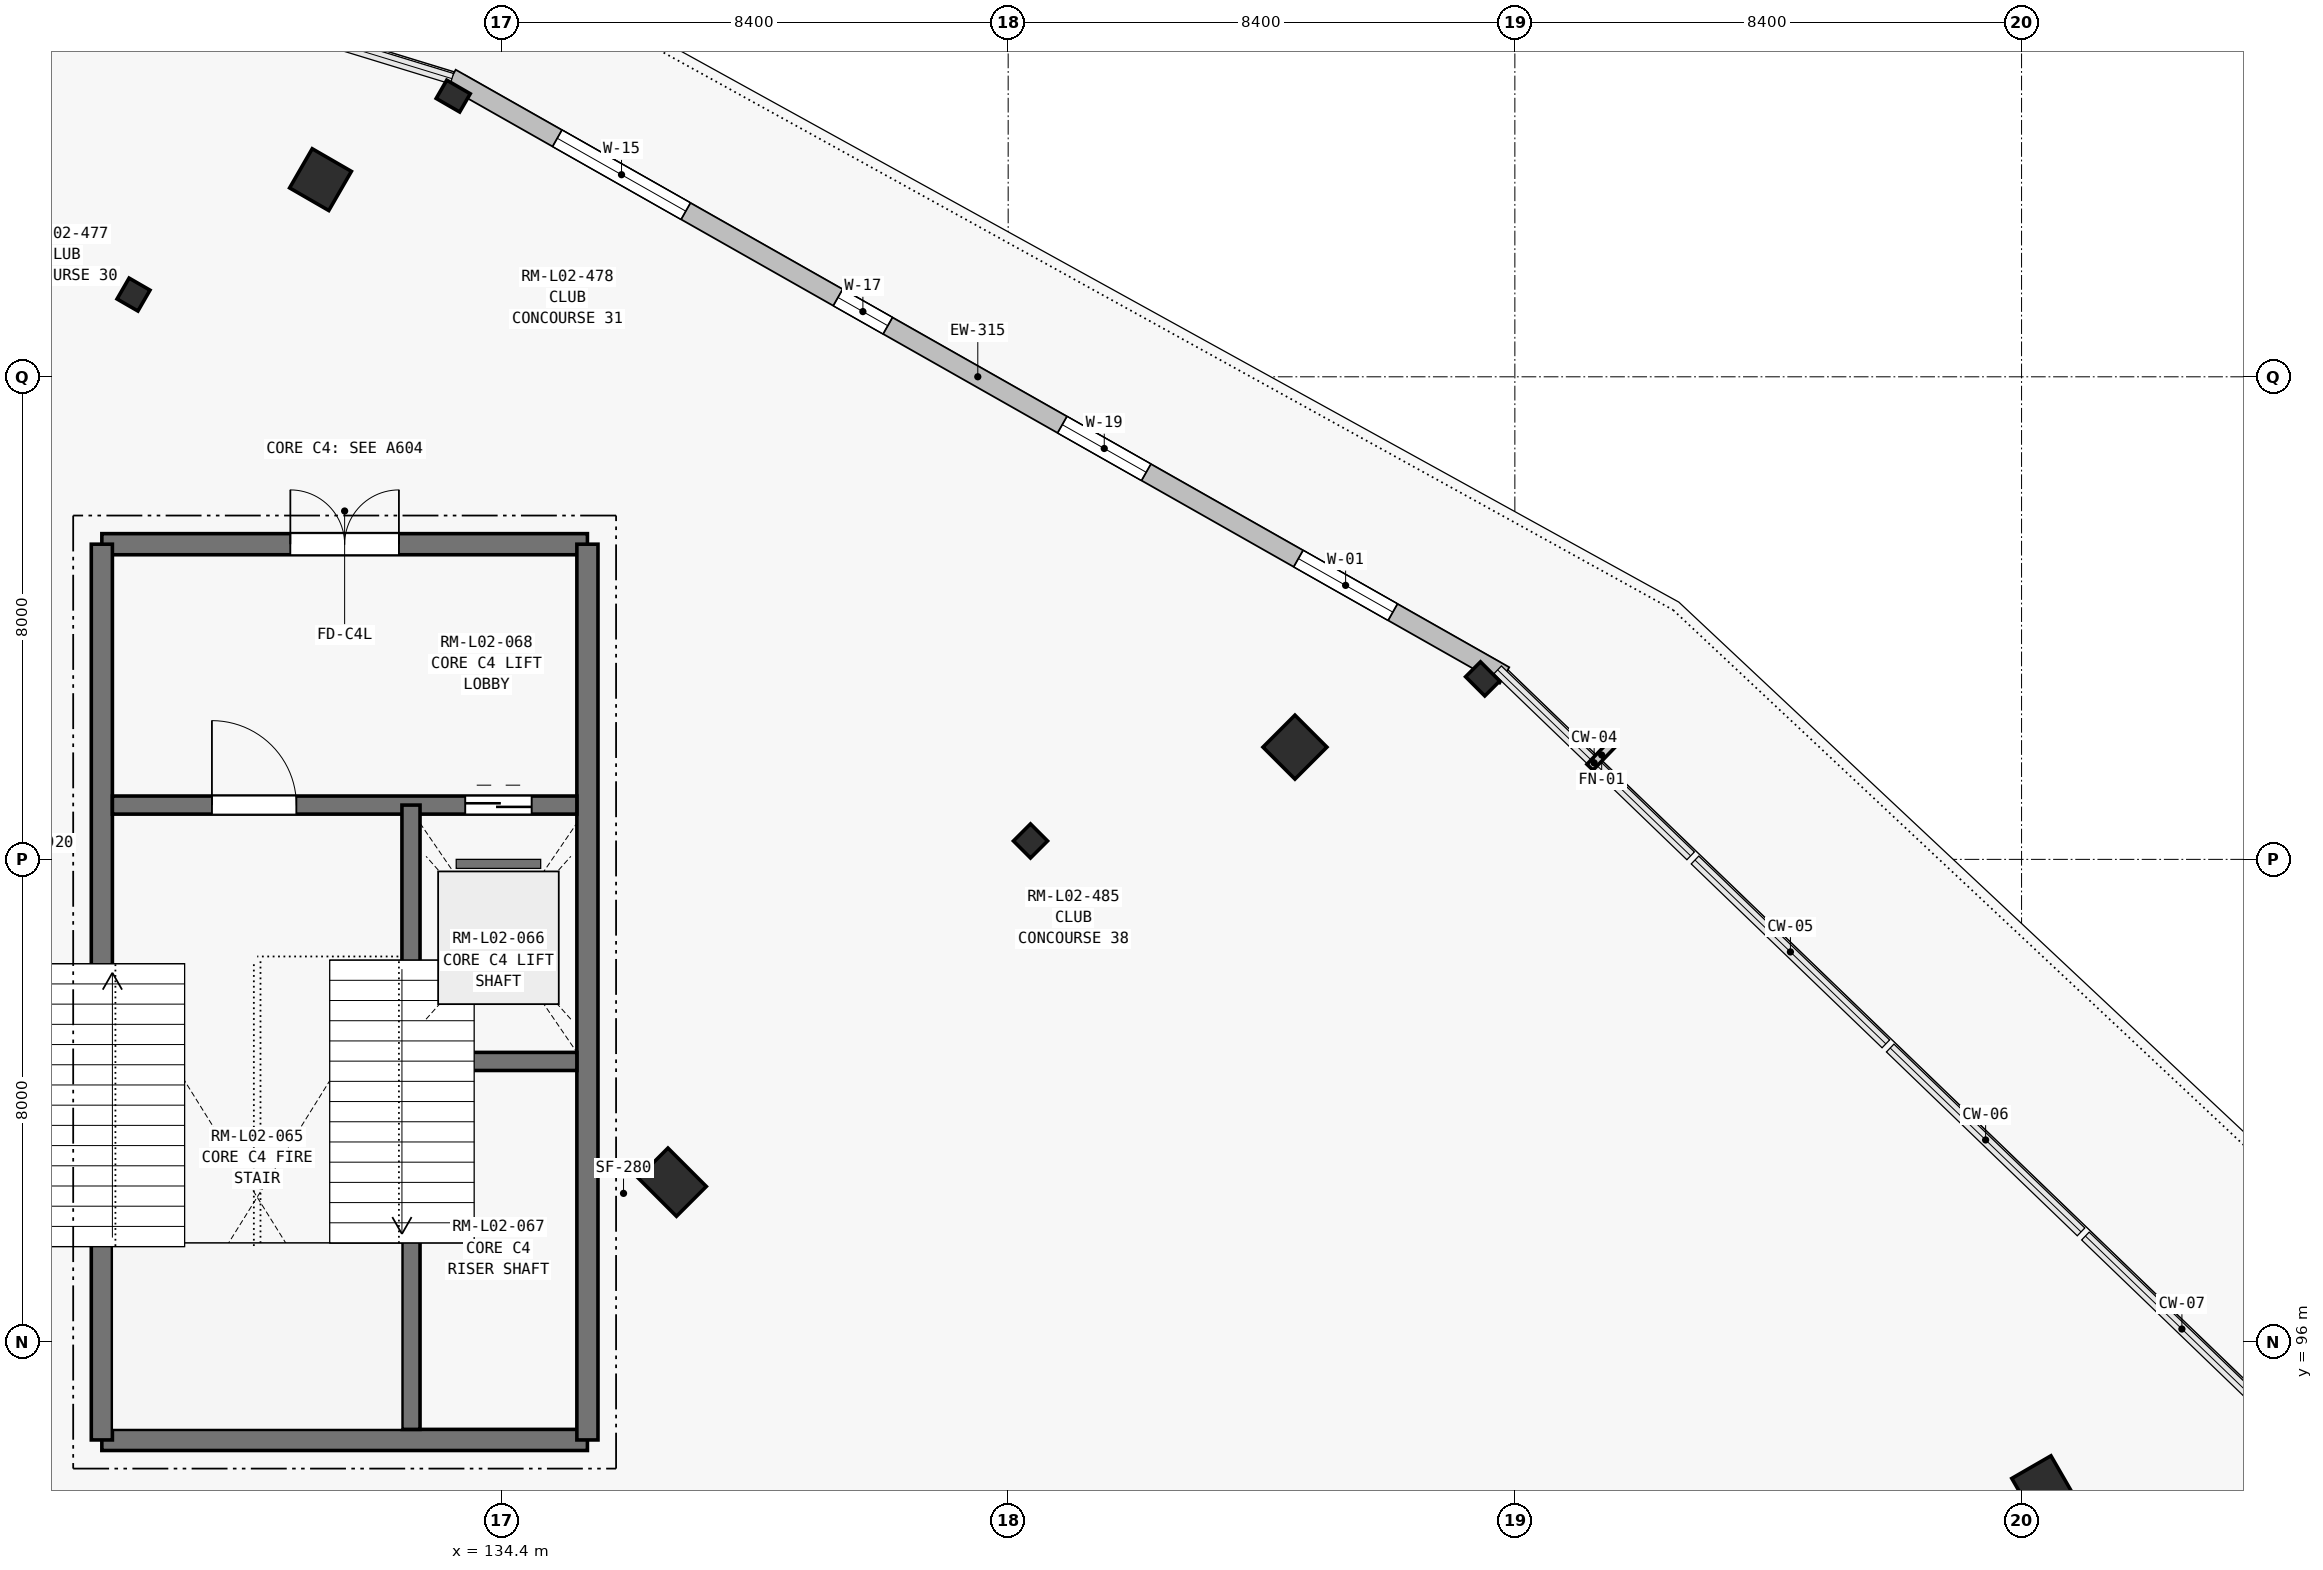
"""IFC4 building model, lengths in metres.
Left out: names, types, materials, properties, quantities, classifications, styles, units other than length and angle.
Written with IfcOpenShell. Run it as: python <this file> out.ifc"""

import sys

from ifc_helpers import new_model, si_unit, direction, frame, frame_2d, origin, origin_2d, place, context, subcontext, project, spatial, rectangle, i_section, extrude, element, fill, save


model = new_model("IFC4")
c1 = context("Model", 3, precision=1e-05, world=origin(), true_north=direction((0.0, 1.0)))
c2 = subcontext(c1, "Body", "Model", "MODEL_VIEW")
j1 = project(units=[si_unit("LENGTHUNIT", "METRE"), si_unit("PLANEANGLEUNIT", "RADIAN")], contexts=[c1])
p1 = place(None, origin())
s1 = spatial("IfcSite", under=j1, at=p1, CompositionType="ELEMENT")
p2 = place(p1, origin())
s2 = spatial("IfcBuilding", under=s1, at=p2, CompositionType="ELEMENT")
p3 = place(p2, frame((0.0, 0.0, 9.9)))
s3 = spatial("IfcBuildingStorey", under=s2, at=p3, CompositionType="ELEMENT", Elevation=9.9)
p4 = place(p3, frame((137.231, 98.648, 0.0), z_axis=(0.0, 0.0, 1.0), x_axis=(0.707106781187, 0.707106781187, 0.0)))
e1 = element("IfcColumn", 1, at=p4, inside=s3, PredefinedType="COLUMN", context=c2, shape_type="SweptSolid", body=[
    extrude(rectangle(XDim=0.7, YDim=0.9, at=origin_2d()), origin(), (0.0, 0.0, 1.0), 4.5),
])
for number, where, z_axis, x_axis in (
    (2, (143.17, 104.305, 0.0), (0.0, 0.0, 1.0), (0.707, 0.707, 0.0)),
    (3, (128.3, 113.363, 0.0), (0.0, 0.0, 1.0), (0.5, 0.866, 0.0)),
):
    element("IfcColumn", number, at=place(p3, frame(where, z_axis=z_axis, x_axis=x_axis)), inside=s3, PredefinedType="COLUMN", context=c2, shape_type="SweptSolid", body=[
        extrude(i_section(OverallWidth=0.4, OverallDepth=0.4, WebThickness=0.016, FlangeThickness=0.028, at=origin_2d()), origin(), (0.0, 0.0, 1.0), 4.5),
    ])
for number, where, z_axis, x_axis in (
    (4, (159.95, 93.6, 0.0), (0.0, 0.0, 1.0), (0.866, 0.5, 0.0)),
    (5, (147.554, 105.861, 0.0), (0.0, 0.0, 1.0), (0.707, 0.707, 0.0)),
    (6, (131.4, 115.269, 0.0), (0.0, 0.0, 1.0), (0.5, 0.866, 0.0)),
):
    element("IfcColumn", number, at=place(p3, frame(where, z_axis=z_axis, x_axis=x_axis)), inside=s3, PredefinedType="COLUMN", context=c2, shape_type="SweptSolid", body=[
        extrude(rectangle(XDim=0.75, YDim=0.75, at=origin_2d()), origin(), (0.0, 0.0, 1.0), 4.5),
    ])
for number, where, z_axis, x_axis in (
    (7, (150.666, 106.992, 0.0), (0.0, 0.0, 1.0), (0.707, 0.707, 0.0)),
    (8, (133.6, 116.654, 0.0), (0.0, 0.0, 1.0), (0.5, 0.866, 0.0)),
):
    element("IfcColumn", number, at=place(p3, frame(where, z_axis=z_axis, x_axis=x_axis)), inside=s3, PredefinedType="PILASTER", context=c2, shape_type="SweptSolid", body=[
        extrude(rectangle(XDim=0.35, YDim=0.45, at=origin_2d()), origin(), (0.0, 0.0, 1.0), 5.45),
    ])
p5 = place(p3, frame((133.563, 116.954, 0.0), z_axis=(0.0, 0.0, 1.0), x_axis=(0.869839071827, -0.493335574557, 0.0)))
e9 = element("IfcWall", 9, at=p5, inside=s3, PredefinedType="SOLIDWALL", context=c2, shape_type="SweptSolid", body=[
    extrude(rectangle(XDim=20.08, YDim=0.315, at=frame_2d((10.04, 0.0))), origin(), (0.0, 0.0, 1.0), 4.265),
])
p6 = place(p5, frame((2.025, 0.0, 0.9)))
e10 = element("IfcOpeningElement", 10, at=p6, cuts=e9, PredefinedType="OPENING", context=c2, shape_type="SweptSolid", body=[
    extrude(rectangle(XDim=2.45, YDim=1.35, at=frame_2d((1.225, 0.675))), frame((0.0, 0.167, 0.0), z_axis=(0.0, -1.0, 0.0), x_axis=(1.0, 0.0, 0.0)), (0.0, 0.0, 1.0), 0.335),
])
p7 = place(p5, frame((7.375, 0.0, 0.75)))
e11 = element("IfcOpeningElement", 11, at=p7, cuts=e9, PredefinedType="OPENING", context=c2, shape_type="SweptSolid", body=[
    extrude(rectangle(XDim=0.95, YDim=2.2, at=frame_2d((0.475, 1.1))), frame((0.0, 0.167, 0.0), z_axis=(0.0, -1.0, 0.0), x_axis=(1.0, 0.0, 0.0)), (0.0, 0.0, 1.0), 0.335),
])
p8 = place(p5, frame((11.65, 0.0, 0.9)))
e12 = element("IfcOpeningElement", 12, at=p8, cuts=e9, PredefinedType="OPENING", context=c2, shape_type="SweptSolid", body=[
    extrude(rectangle(XDim=1.6, YDim=1.45, at=frame_2d((0.8, 0.725))), frame((0.0, 0.167, 0.0), z_axis=(0.0, -1.0, 0.0), x_axis=(1.0, 0.0, 0.0)), (0.0, 0.0, 1.0), 0.335),
])
p9 = place(p5, frame((16.15, 0.0, 0.75)))
e13 = element("IfcOpeningElement", 13, at=p9, cuts=e9, PredefinedType="OPENING", context=c2, shape_type="SweptSolid", body=[
    extrude(rectangle(XDim=1.8, YDim=2.4, at=frame_2d((0.9, 1.2))), frame((0.0, 0.167, 0.0), z_axis=(0.0, -1.0, 0.0), x_axis=(1.0, 0.0, 0.0)), (0.0, 0.0, 1.0), 0.335),
])
p10 = place(p3, frame((127.775, 94.375, 0.0), z_axis=(0.0, 0.0, 1.0), x_axis=(1.0, 0.0, 0.0)))
e14 = element("IfcWall", 14, at=p10, inside=s3, PredefinedType="SHEAR", context=c2, shape_type="SweptSolid", body=[
    extrude(rectangle(XDim=8.05, YDim=0.35, at=frame_2d((4.025, 0.0))), origin(), (0.0, 0.0, 1.0), 4.5),
])
p11 = place(p3, frame((127.775, 109.225, 0.0), z_axis=(0.0, 0.0, 1.0), x_axis=(1.0, 0.0, 0.0)))
e15 = element("IfcWall", 15, at=p11, inside=s3, PredefinedType="SHEAR", context=c2, shape_type="SweptSolid", body=[
    extrude(rectangle(XDim=8.05, YDim=0.35, at=frame_2d((4.025, 0.0))), origin(), (0.0, 0.0, 1.0), 4.5),
])
p12 = place(p11, frame((3.125, 0.0, 0.0)))
e16 = element("IfcOpeningElement", 16, at=p12, cuts=e15, PredefinedType="OPENING", context=c2, shape_type="SweptSolid", body=[
    extrude(rectangle(XDim=1.8, YDim=2.25, at=frame_2d((0.9, 1.125))), frame((0.0, 0.185, 0.0), z_axis=(0.0, -1.0, 0.0), x_axis=(1.0, 0.0, 0.0)), (0.0, 0.0, 1.0), 0.37),
])
for number, where, z_axis, x_axis in (
    (17, (127.775, 94.375, 0.0), (0.0, 0.0, 1.0), (0.0, 1.0, 0.0)),
    (18, (135.825, 94.375, 0.0), (0.0, 0.0, 1.0), (0.0, 1.0, 0.0)),
):
    element("IfcWall", number, at=place(p3, frame(where, z_axis=z_axis, x_axis=x_axis)), inside=s3, PredefinedType="SHEAR", context=c2, shape_type="SweptSolid", body=[
        extrude(rectangle(XDim=14.85, YDim=0.35, at=frame_2d((7.425, 0.0))), origin(), (0.0, 0.0, 1.0), 4.5),
    ])
p13 = place(p3, frame((127.95, 104.9, 0.0), z_axis=(0.0, 0.0, 1.0), x_axis=(1.0, 0.0, 0.0)))
e19 = element("IfcWall", 19, at=p13, inside=s3, PredefinedType="SHEAR", context=c2, shape_type="SweptSolid", body=[
    extrude(rectangle(XDim=7.7, YDim=0.3, at=frame_2d((3.85, 0.0))), origin(), (0.0, 0.0, 1.0), 4.5),
])
p14 = place(p13, frame((1.65, 0.0, 0.0)))
e20 = element("IfcOpeningElement", 20, at=p14, cuts=e19, PredefinedType="OPENING", context=c2, shape_type="SweptSolid", body=[
    extrude(rectangle(XDim=1.4, YDim=2.2, at=frame_2d((0.7, 1.1))), frame((0.0, 0.16, 0.0), z_axis=(0.0, -1.0, 0.0), x_axis=(1.0, 0.0, 0.0)), (0.0, 0.0, 1.0), 0.32),
])
p15 = place(p13, frame((5.85, 0.0, 0.0)))
e21 = element("IfcOpeningElement", 21, at=p15, cuts=e19, PredefinedType="OPENING", context=c2, shape_type="SweptSolid", body=[
    extrude(rectangle(XDim=1.1, YDim=2.2, at=frame_2d((0.55, 1.1))), frame((0.0, 0.16, 0.0), z_axis=(0.0, -1.0, 0.0), x_axis=(1.0, 0.0, 0.0)), (0.0, 0.0, 1.0), 0.32),
])
p16 = place(p3, frame((132.9, 94.55, 0.0), z_axis=(0.0, 0.0, 1.0), x_axis=(0.0, 1.0, 0.0)))
e22 = element("IfcWall", 22, at=p16, inside=s3, PredefinedType="SHEAR", context=c2, shape_type="SweptSolid", body=[
    extrude(rectangle(XDim=10.35, YDim=0.3, at=frame_2d((5.175, 0.0))), origin(), (0.0, 0.0, 1.0), 4.5),
])
p17 = place(p3, frame((133.05, 100.65, 0.0), z_axis=(0.0, 0.0, 1.0), x_axis=(1.0, 0.0, 0.0)))
e23 = element("IfcWall", 23, at=p17, inside=s3, PredefinedType="SHEAR", context=c2, shape_type="SweptSolid", body=[
    extrude(rectangle(XDim=2.6, YDim=0.3, at=frame_2d((1.3, 0.0))), origin(), (0.0, 0.0, 1.0), 4.5),
])
p18 = place(p6, origin())
e24 = element("IfcWindow", 24, at=p18, inside=s3, PartitioningType="SINGLE_PANEL", PredefinedType="WINDOW", context=c2, shape_type="SweptSolid", body=[
    extrude(rectangle(XDim=2.45, YDim=1.35, at=frame_2d((1.225, 0.675))), frame((0.0, 0.03, 0.0), z_axis=(0.0, -1.0, 0.0), x_axis=(1.0, 0.0, 0.0)), (0.0, 0.0, 1.0), 0.06),
])
fill(e10, e24)
p19 = place(p7, origin())
e25 = element("IfcWindow", 25, at=p19, inside=s3, PartitioningType="SINGLE_PANEL", PredefinedType="WINDOW", context=c2, shape_type="SweptSolid", body=[
    extrude(rectangle(XDim=0.95, YDim=2.2, at=frame_2d((0.475, 1.1))), frame((0.0, 0.03, 0.0), z_axis=(0.0, -1.0, 0.0), x_axis=(1.0, 0.0, 0.0)), (0.0, 0.0, 1.0), 0.06),
])
fill(e11, e25)
p20 = place(p8, origin())
e26 = element("IfcWindow", 26, at=p20, inside=s3, PartitioningType="SINGLE_PANEL", PredefinedType="WINDOW", context=c2, shape_type="SweptSolid", body=[
    extrude(rectangle(XDim=1.6, YDim=1.45, at=frame_2d((0.8, 0.725))), frame((0.0, 0.03, 0.0), z_axis=(0.0, -1.0, 0.0), x_axis=(1.0, 0.0, 0.0)), (0.0, 0.0, 1.0), 0.06),
])
fill(e12, e26)
p21 = place(p9, origin())
e27 = element("IfcWindow", 27, at=p21, inside=s3, PartitioningType="SINGLE_PANEL", PredefinedType="WINDOW", context=c2, shape_type="SweptSolid", body=[
    extrude(rectangle(XDim=1.8, YDim=2.4, at=frame_2d((0.9, 1.2))), frame((0.0, 0.03, 0.0), z_axis=(0.0, -1.0, 0.0), x_axis=(1.0, 0.0, 0.0)), (0.0, 0.0, 1.0), 0.06),
])
fill(e13, e27)
p22 = place(p12, origin())
e28 = element("IfcDoor", 28, at=p22, inside=s3, OperationType="DOUBLE_DOOR_SINGLE_SWING", PredefinedType="DOOR", context=c2, shape_type="SweptSolid", body=[
    extrude(rectangle(XDim=1.8, YDim=2.25, at=frame_2d((0.9, 1.125))), frame((0.0, 0.025, 0.0), z_axis=(0.0, -1.0, 0.0), x_axis=(1.0, 0.0, 0.0)), (0.0, 0.0, 1.0), 0.05),
])
fill(e16, e28)
p23 = place(p14, origin())
e29 = element("IfcDoor", 29, at=p23, inside=s3, OperationType="SINGLE_SWING_LEFT", PredefinedType="DOOR", context=c2, shape_type="SweptSolid", body=[
    extrude(rectangle(XDim=1.4, YDim=2.2, at=frame_2d((0.7, 1.1))), frame((0.0, 0.025, 0.0), z_axis=(0.0, -1.0, 0.0), x_axis=(1.0, 0.0, 0.0)), (0.0, 0.0, 1.0), 0.05),
])
fill(e20, e29)
p24 = place(p15, origin())
e30 = element("IfcDoor", 30, at=p24, inside=s3, OperationType="SLIDING_TO_LEFT", PredefinedType="DOOR", context=c2, shape_type="SweptSolid", body=[
    extrude(rectangle(XDim=1.1, YDim=2.2, at=frame_2d((0.55, 1.1))), frame((0.0, 0.025, 0.0), z_axis=(0.0, -1.0, 0.0), x_axis=(1.0, 0.0, 0.0)), (0.0, 0.0, 1.0), 0.05),
])
fill(e21, e30)
save(model, sys.argv[1])
